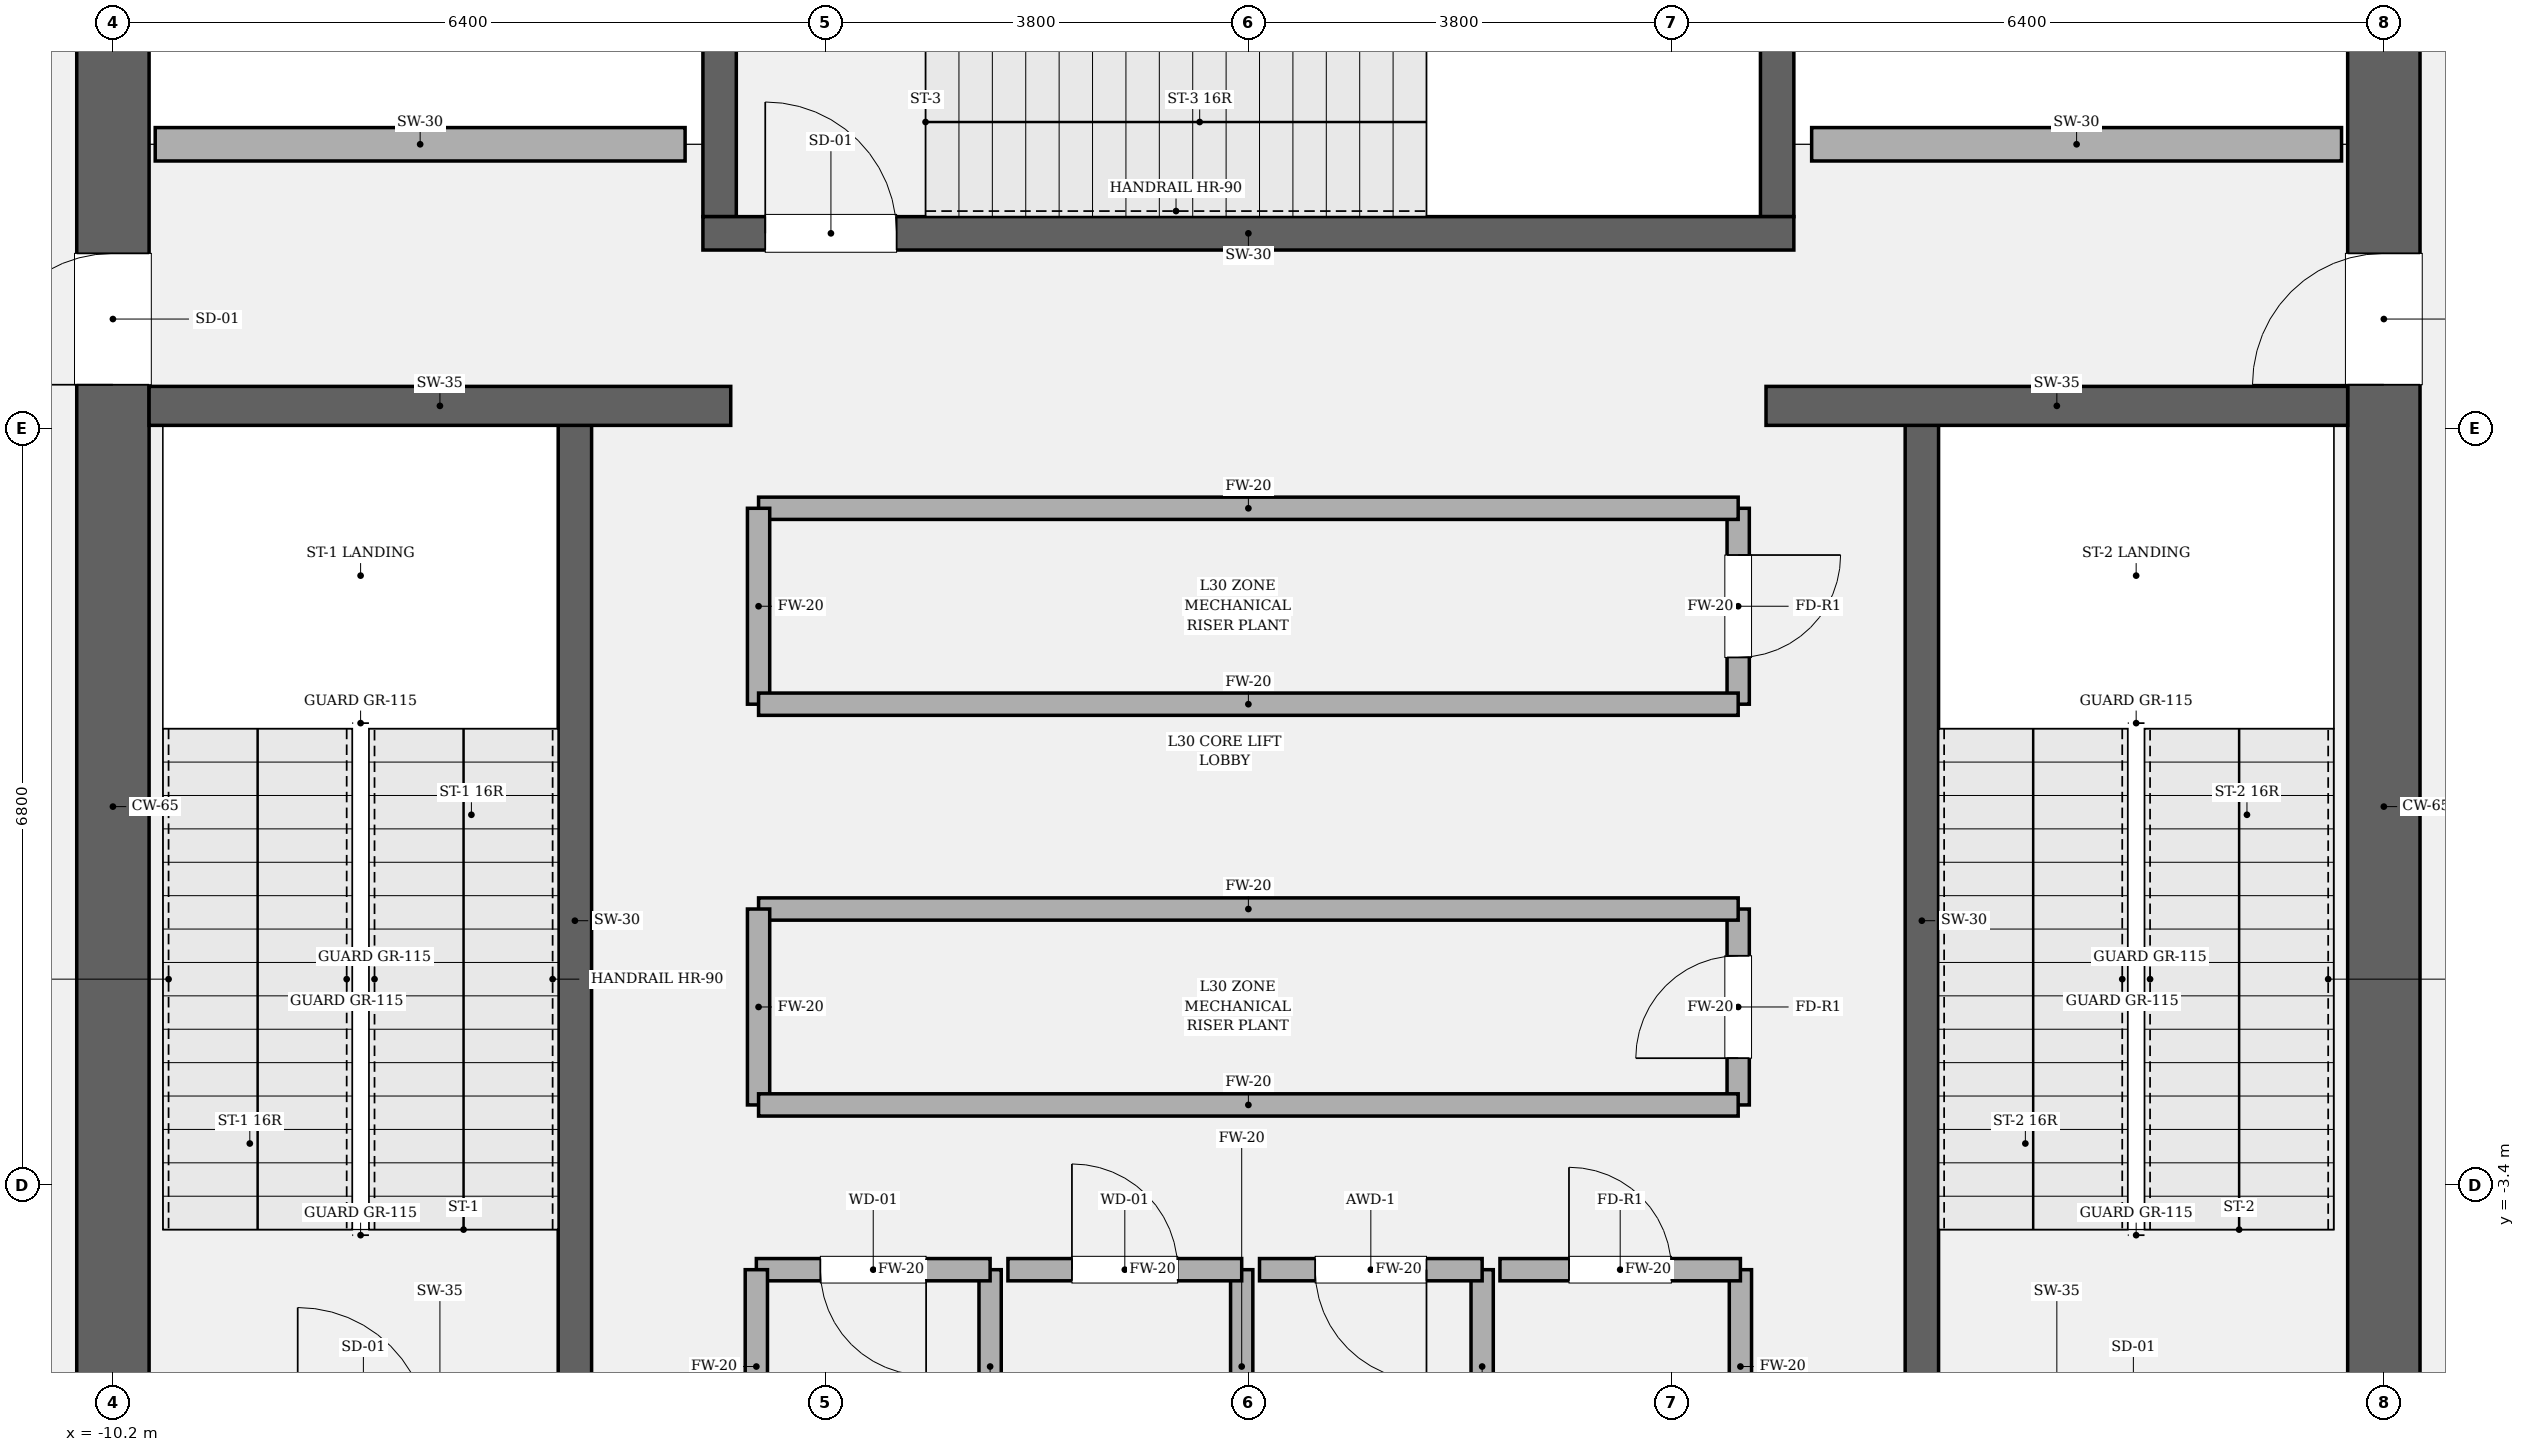
"""IFC4 building model, lengths in metres.
Left out: names, types, materials, properties, quantities, classifications, styles, units other than length and angle.
Written with IfcOpenShell. Run it as: python <this file> out.ifc"""

import sys

from ifc_helpers import new_model, si_unit, direction, frame, frame_2d, origin, place, context, subcontext, project, spatial, rectangle, extrude, element, fill, save


model = new_model("IFC4")
c1 = context("Model", 3, precision=1e-05, world=origin(), true_north=direction((0.0, 1.0)))
c2 = subcontext(c1, "Body", "Model", "MODEL_VIEW")
j1 = project(units=[si_unit("LENGTHUNIT", "METRE"), si_unit("PLANEANGLEUNIT", "RADIAN")], contexts=[c1])
p1 = place(None, origin())
s1 = spatial("IfcSite", under=j1, at=p1, CompositionType="ELEMENT")
p2 = place(p1, origin())
s2 = spatial("IfcBuilding", under=s1, at=p2, CompositionType="ELEMENT")
p3 = place(p2, frame((0.0, 0.0, 130.2)))
s3 = spatial("IfcBuildingStorey", under=s2, at=p3, CompositionType="ELEMENT", Elevation=130.2)
p4 = place(p3, frame((-10.2, -8.875, 0.0), z_axis=(0.0, 0.0, 1.0), x_axis=(0.0, 1.0, 0.0)))
e1 = element("IfcWall", 1, at=p4, inside=s3, PredefinedType="SHEAR", context=c2, shape_type="SweptSolid", body=[
    extrude(rectangle(XDim=17.75, YDim=0.65, at=frame_2d((8.875, 0.0))), origin(), (0.0, 0.0, 1.0), 4.8),
])
p5 = place(p4, frame((12.665, 0.0, 0.0)))
e2 = element("IfcOpeningElement", 2, at=p5, cuts=e1, PredefinedType="OPENING", context=c2, shape_type="SweptSolid", body=[
    extrude(rectangle(XDim=1.18, YDim=2.2, at=frame_2d((0.59, 1.1))), frame((0.0, 0.335, 0.0), z_axis=(0.0, -1.0, 0.0), x_axis=(1.0, 0.0, 0.0)), (0.0, 0.0, 1.0), 0.67),
])
p6 = place(p3, frame((10.2, 8.875, 0.0), z_axis=(0.0, 0.0, 1.0), x_axis=(0.0, -1.0, 0.0)))
e3 = element("IfcWall", 3, at=p6, inside=s3, PredefinedType="SHEAR", context=c2, shape_type="SweptSolid", body=[
    extrude(rectangle(XDim=17.75, YDim=0.65, at=frame_2d((8.875, 0.0))), origin(), (0.0, 0.0, 1.0), 4.8),
])
p7 = place(p6, frame((3.905, 0.0, 0.0)))
e4 = element("IfcOpeningElement", 4, at=p7, cuts=e3, PredefinedType="OPENING", context=c2, shape_type="SweptSolid", body=[
    extrude(rectangle(XDim=1.18, YDim=2.2, at=frame_2d((0.59, 1.1))), frame((0.0, 0.335, 0.0), z_axis=(0.0, -1.0, 0.0), x_axis=(1.0, 0.0, 0.0)), (0.0, 0.0, 1.0), 0.67),
])
for number, where, z_axis, x_axis in (
    (5, (-6.05, -5.5, 0.0), (0.0, 0.0, 1.0), (0.0, 1.0, 0.0)),
    (6, (6.05, 3.45, 0.0), (0.0, 0.0, 1.0), (0.0, -1.0, 0.0)),
):
    element("IfcWall", number, at=place(p3, frame(where, z_axis=z_axis, x_axis=x_axis)), inside=s3, PredefinedType="SOLIDWALL", context=c2, shape_type="SweptSolid", body=[
        extrude(rectangle(XDim=8.95, YDim=0.3, at=frame_2d((4.475, 0.0))), origin(), (0.0, 0.0, 1.0), 4.8),
    ])
for number, where, z_axis, x_axis in (
    (7, (-4.75, 5.3, 0.0), (0.0, 0.0, 1.0), (0.0, 1.0, 0.0)),
    (8, (4.75, 8.875, 0.0), (0.0, 0.0, 1.0), (0.0, -1.0, 0.0)),
):
    element("IfcWall", number, at=place(p3, frame(where, z_axis=z_axis, x_axis=x_axis)), inside=s3, PredefinedType="SOLIDWALL", context=c2, shape_type="SweptSolid", body=[
        extrude(rectangle(XDim=3.575, YDim=0.3, at=frame_2d((1.788, 0.0))), origin(), (0.0, 0.0, 1.0), 4.8),
    ])
p8 = place(p3, frame((-4.9, 5.15, 0.0), z_axis=(0.0, 0.0, 1.0), x_axis=(1.0, 0.0, 0.0)))
e9 = element("IfcWall", 9, at=p8, inside=s3, PredefinedType="SOLIDWALL", context=c2, shape_type="SweptSolid", body=[
    extrude(rectangle(XDim=9.8, YDim=0.3, at=frame_2d((4.9, 0.0))), origin(), (0.0, 0.0, 1.0), 4.8),
])
p9 = place(p8, frame((0.56, 0.0, 0.0)))
e10 = element("IfcOpeningElement", 10, at=p9, cuts=e9, PredefinedType="OPENING", context=c2, shape_type="SweptSolid", body=[
    extrude(rectangle(XDim=1.18, YDim=2.2, at=frame_2d((0.59, 1.1))), frame((0.0, 0.16, 0.0), z_axis=(0.0, -1.0, 0.0), x_axis=(1.0, 0.0, 0.0)), (0.0, 0.0, 1.0), 0.32),
])
for number, where, z_axis, x_axis in (
    (11, (-9.875, 3.6, 0.0), (0.0, 0.0, 1.0), (1.0, 0.0, 0.0)),
    (12, (4.65, 3.6, 0.0), (0.0, 0.0, 1.0), (1.0, 0.0, 0.0)),
):
    element("IfcWall", number, at=place(p3, frame(where, z_axis=z_axis, x_axis=x_axis)), inside=s3, PredefinedType="SOLIDWALL", context=c2, shape_type="SweptSolid", body=[
        extrude(rectangle(XDim=5.225, YDim=0.35, at=frame_2d((2.613, 0.0))), origin(), (0.0, 0.0, 1.0), 4.8),
    ])
for number, where, z_axis, x_axis in (
    (13, (-9.82, 5.95, 0.0), (0.0, 0.0, 1.0), (1.0, 0.0, 0.0)),
    (14, (5.06, 5.95, 0.0), (0.0, 0.0, 1.0), (1.0, 0.0, 0.0)),
):
    element("IfcWall", number, at=place(p3, frame(where, z_axis=z_axis, x_axis=x_axis)), inside=s3, PredefinedType="SOLIDWALL", context=c2, shape_type="SweptSolid", body=[
        extrude(rectangle(XDim=4.76, YDim=0.3, at=frame_2d((2.38, 0.0))), origin(), (0.0, 0.0, 1.0), 4.54),
    ])
p10 = place(p3, frame((-2.32, -5.9, 0.0), z_axis=(0.0, 0.0, 1.0), x_axis=(0.0, 1.0, 0.0)))
e15 = element("IfcWall", 15, at=p10, inside=s3, PredefinedType="SOLIDWALL", context=c2, shape_type="SweptSolid", body=[
    extrude(rectangle(XDim=1.74, YDim=0.2, at=frame_2d((0.87, 0.0))), origin(), (0.0, 0.0, 1.0), 4.54),
])
p11 = place(p3, frame((-2.32, -4.16, 0.0), z_axis=(0.0, 0.0, 1.0), x_axis=(-1.0, 0.0, 0.0)))
e16 = element("IfcWall", 16, at=p11, inside=s3, PredefinedType="SOLIDWALL", context=c2, shape_type="SweptSolid", body=[
    extrude(rectangle(XDim=2.1, YDim=0.2, at=frame_2d((1.05, 0.0))), origin(), (0.0, 0.0, 1.0), 4.54),
])
p12 = place(p11, frame((0.575, 0.0, 0.0)))
e17 = element("IfcOpeningElement", 17, at=p12, cuts=e16, PredefinedType="OPENING", context=c2, shape_type="SweptSolid", body=[
    extrude(rectangle(XDim=0.95, YDim=2.15, at=frame_2d((0.475, 1.075))), frame((0.0, 0.11, 0.0), z_axis=(0.0, -1.0, 0.0), x_axis=(1.0, 0.0, 0.0)), (0.0, 0.0, 1.0), 0.22),
])
for number, where, z_axis, x_axis in (
    (18, (-4.42, -4.16, 0.0), (0.0, 0.0, 1.0), (0.0, -1.0, 0.0)),
    (19, (-0.06, -5.9, 0.0), (0.0, 0.0, 1.0), (0.0, 1.0, 0.0)),
):
    element("IfcWall", number, at=place(p3, frame(where, z_axis=z_axis, x_axis=x_axis)), inside=s3, PredefinedType="SOLIDWALL", context=c2, shape_type="SweptSolid", body=[
        extrude(rectangle(XDim=1.74, YDim=0.2, at=frame_2d((0.87, 0.0))), origin(), (0.0, 0.0, 1.0), 4.54),
    ])
p13 = place(p3, frame((-0.06, -4.16, 0.0), z_axis=(0.0, 0.0, 1.0), x_axis=(-1.0, 0.0, 0.0)))
e20 = element("IfcWall", 20, at=p13, inside=s3, PredefinedType="SOLIDWALL", context=c2, shape_type="SweptSolid", body=[
    extrude(rectangle(XDim=2.1, YDim=0.2, at=frame_2d((1.05, 0.0))), origin(), (0.0, 0.0, 1.0), 4.54),
])
p14 = place(p13, frame((0.575, 0.0, 0.0)))
e21 = element("IfcOpeningElement", 21, at=p14, cuts=e20, PredefinedType="OPENING", context=c2, shape_type="SweptSolid", body=[
    extrude(rectangle(XDim=0.95, YDim=2.15, at=frame_2d((0.475, 1.075))), frame((0.0, 0.11, 0.0), z_axis=(0.0, -1.0, 0.0), x_axis=(1.0, 0.0, 0.0)), (0.0, 0.0, 1.0), 0.22),
])
p15 = place(p3, frame((2.1, -5.9, 0.0), z_axis=(0.0, 0.0, 1.0), x_axis=(0.0, 1.0, 0.0)))
e22 = element("IfcWall", 22, at=p15, inside=s3, PredefinedType="SOLIDWALL", context=c2, shape_type="SweptSolid", body=[
    extrude(rectangle(XDim=1.74, YDim=0.2, at=frame_2d((0.87, 0.0))), origin(), (0.0, 0.0, 1.0), 4.54),
])
p16 = place(p3, frame((2.1, -4.16, 0.0), z_axis=(0.0, 0.0, 1.0), x_axis=(-1.0, 0.0, 0.0)))
e23 = element("IfcWall", 23, at=p16, inside=s3, PredefinedType="SOLIDWALL", context=c2, shape_type="SweptSolid", body=[
    extrude(rectangle(XDim=2.0, YDim=0.2, at=frame_2d((1.0, 0.0))), origin(), (0.0, 0.0, 1.0), 4.54),
])
p17 = place(p16, frame((0.5, 0.0, 0.0)))
e24 = element("IfcOpeningElement", 24, at=p17, cuts=e23, PredefinedType="OPENING", context=c2, shape_type="SweptSolid", body=[
    extrude(rectangle(XDim=1.0, YDim=2.15, at=frame_2d((0.5, 1.075))), frame((0.0, 0.11, 0.0), z_axis=(0.0, -1.0, 0.0), x_axis=(1.0, 0.0, 0.0)), (0.0, 0.0, 1.0), 0.22),
])
p18 = place(p3, frame((4.42, -5.9, 0.0), z_axis=(0.0, 0.0, 1.0), x_axis=(0.0, 1.0, 0.0)))
e25 = element("IfcWall", 25, at=p18, inside=s3, PredefinedType="SOLIDWALL", context=c2, shape_type="SweptSolid", body=[
    extrude(rectangle(XDim=1.74, YDim=0.2, at=frame_2d((0.87, 0.0))), origin(), (0.0, 0.0, 1.0), 4.54),
])
p19 = place(p3, frame((4.42, -4.16, 0.0), z_axis=(0.0, 0.0, 1.0), x_axis=(-1.0, 0.0, 0.0)))
e26 = element("IfcWall", 26, at=p19, inside=s3, PredefinedType="SOLIDWALL", context=c2, shape_type="SweptSolid", body=[
    extrude(rectangle(XDim=2.16, YDim=0.2, at=frame_2d((1.08, 0.0))), origin(), (0.0, 0.0, 1.0), 4.54),
])
p20 = place(p19, frame((0.62, 0.0, 0.0)))
e27 = element("IfcOpeningElement", 27, at=p20, cuts=e26, PredefinedType="OPENING", context=c2, shape_type="SweptSolid", body=[
    extrude(rectangle(XDim=0.92, YDim=2.1, at=frame_2d((0.46, 1.05))), frame((0.0, 0.11, 0.0), z_axis=(0.0, -1.0, 0.0), x_axis=(1.0, 0.0, 0.0)), (0.0, 0.0, 1.0), 0.22),
])
p21 = place(p3, frame((4.4, -2.68, 0.0), z_axis=(0.0, 0.0, 1.0), x_axis=(0.0, 1.0, 0.0)))
e28 = element("IfcWall", 28, at=p21, inside=s3, PredefinedType="SOLIDWALL", context=c2, shape_type="SweptSolid", body=[
    extrude(rectangle(XDim=1.76, YDim=0.2, at=frame_2d((0.88, 0.0))), origin(), (0.0, 0.0, 1.0), 4.54),
])
p22 = place(p21, frame((0.42, 0.0, 0.0)))
e29 = element("IfcOpeningElement", 29, at=p22, cuts=e28, PredefinedType="OPENING", context=c2, shape_type="SweptSolid", body=[
    extrude(rectangle(XDim=0.92, YDim=2.1, at=frame_2d((0.46, 1.05))), frame((0.0, 0.11, 0.0), z_axis=(0.0, -1.0, 0.0), x_axis=(1.0, 0.0, 0.0)), (0.0, 0.0, 1.0), 0.22),
])
p23 = place(p3, frame((4.4, -0.92, 0.0), z_axis=(0.0, 0.0, 1.0), x_axis=(-1.0, 0.0, 0.0)))
e30 = element("IfcWall", 30, at=p23, inside=s3, PredefinedType="SOLIDWALL", context=c2, shape_type="SweptSolid", body=[
    extrude(rectangle(XDim=8.8, YDim=0.2, at=frame_2d((4.4, 0.0))), origin(), (0.0, 0.0, 1.0), 4.54),
])
p24 = place(p3, frame((-4.4, -0.92, 0.0), z_axis=(0.0, 0.0, 1.0), x_axis=(0.0, -1.0, 0.0)))
e31 = element("IfcWall", 31, at=p24, inside=s3, PredefinedType="SOLIDWALL", context=c2, shape_type="SweptSolid", body=[
    extrude(rectangle(XDim=1.76, YDim=0.2, at=frame_2d((0.88, 0.0))), origin(), (0.0, 0.0, 1.0), 4.54),
])
p25 = place(p3, frame((-4.4, -2.68, 0.0), z_axis=(0.0, 0.0, 1.0), x_axis=(1.0, 0.0, 0.0)))
e32 = element("IfcWall", 32, at=p25, inside=s3, PredefinedType="SOLIDWALL", context=c2, shape_type="SweptSolid", body=[
    extrude(rectangle(XDim=8.8, YDim=0.2, at=frame_2d((4.4, 0.0))), origin(), (0.0, 0.0, 1.0), 4.54),
])
p26 = place(p3, frame((4.4, 0.92, 0.0), z_axis=(0.0, 0.0, 1.0), x_axis=(0.0, 1.0, 0.0)))
e33 = element("IfcWall", 33, at=p26, inside=s3, PredefinedType="SOLIDWALL", context=c2, shape_type="SweptSolid", body=[
    extrude(rectangle(XDim=1.76, YDim=0.2, at=frame_2d((0.88, 0.0))), origin(), (0.0, 0.0, 1.0), 4.54),
])
p27 = place(p26, frame((0.42, 0.0, 0.0)))
e34 = element("IfcOpeningElement", 34, at=p27, cuts=e33, PredefinedType="OPENING", context=c2, shape_type="SweptSolid", body=[
    extrude(rectangle(XDim=0.92, YDim=2.1, at=frame_2d((0.46, 1.05))), frame((0.0, 0.11, 0.0), z_axis=(0.0, -1.0, 0.0), x_axis=(1.0, 0.0, 0.0)), (0.0, 0.0, 1.0), 0.22),
])
p28 = place(p3, frame((4.4, 2.68, 0.0), z_axis=(0.0, 0.0, 1.0), x_axis=(-1.0, 0.0, 0.0)))
e35 = element("IfcWall", 35, at=p28, inside=s3, PredefinedType="SOLIDWALL", context=c2, shape_type="SweptSolid", body=[
    extrude(rectangle(XDim=8.8, YDim=0.2, at=frame_2d((4.4, 0.0))), origin(), (0.0, 0.0, 1.0), 4.54),
])
p29 = place(p3, frame((-4.4, 2.68, 0.0), z_axis=(0.0, 0.0, 1.0), x_axis=(0.0, -1.0, 0.0)))
e36 = element("IfcWall", 36, at=p29, inside=s3, PredefinedType="SOLIDWALL", context=c2, shape_type="SweptSolid", body=[
    extrude(rectangle(XDim=1.76, YDim=0.2, at=frame_2d((0.88, 0.0))), origin(), (0.0, 0.0, 1.0), 4.54),
])
p30 = place(p3, frame((-4.4, 0.92, 0.0), z_axis=(0.0, 0.0, 1.0), x_axis=(1.0, 0.0, 0.0)))
e37 = element("IfcWall", 37, at=p30, inside=s3, PredefinedType="SOLIDWALL", context=c2, shape_type="SweptSolid", body=[
    extrude(rectangle(XDim=8.8, YDim=0.2, at=frame_2d((4.4, 0.0))), origin(), (0.0, 0.0, 1.0), 4.54),
])
p31 = place(p9, origin())
e38 = element("IfcDoor", 38, at=p31, inside=s3, OperationType="SINGLE_SWING_LEFT", PredefinedType="DOOR", context=c2, shape_type="SweptSolid", body=[
    extrude(rectangle(XDim=1.18, YDim=2.2, at=frame_2d((0.59, 1.1))), frame((0.0, 0.025, 0.0), z_axis=(0.0, -1.0, 0.0), x_axis=(1.0, 0.0, 0.0)), (0.0, 0.0, 1.0), 0.05),
])
fill(e10, e38)
p32 = place(p5, origin())
e39 = element("IfcDoor", 39, at=p32, inside=s3, OperationType="SINGLE_SWING_LEFT", PredefinedType="DOOR", context=c2, shape_type="SweptSolid", body=[
    extrude(rectangle(XDim=1.18, YDim=2.2, at=frame_2d((0.59, 1.1))), frame((0.0, 0.025, 0.0), z_axis=(0.0, -1.0, 0.0), x_axis=(1.0, 0.0, 0.0)), (0.0, 0.0, 1.0), 0.05),
])
fill(e2, e39)
p33 = place(p7, origin())
e40 = element("IfcDoor", 40, at=p33, inside=s3, OperationType="SINGLE_SWING_RIGHT", PredefinedType="DOOR", context=c2, shape_type="SweptSolid", body=[
    extrude(rectangle(XDim=1.18, YDim=2.2, at=frame_2d((0.59, 1.1))), frame((0.0, 0.025, 0.0), z_axis=(0.0, -1.0, 0.0), x_axis=(1.0, 0.0, 0.0)), (0.0, 0.0, 1.0), 0.05),
])
fill(e4, e40)
p34 = place(p12, origin())
e41 = element("IfcDoor", 41, at=p34, inside=s3, OperationType="SINGLE_SWING_LEFT", PredefinedType="DOOR", context=c2, shape_type="SweptSolid", body=[
    extrude(rectangle(XDim=0.95, YDim=2.15, at=frame_2d((0.475, 1.075))), frame((0.0, 0.025, 0.0), z_axis=(0.0, -1.0, 0.0), x_axis=(1.0, 0.0, 0.0)), (0.0, 0.0, 1.0), 0.05),
])
fill(e17, e41)
p35 = place(p14, origin())
e42 = element("IfcDoor", 42, at=p35, inside=s3, OperationType="SINGLE_SWING_RIGHT", PredefinedType="DOOR", context=c2, shape_type="SweptSolid", body=[
    extrude(rectangle(XDim=0.95, YDim=2.15, at=frame_2d((0.475, 1.075))), frame((0.0, 0.025, 0.0), z_axis=(0.0, -1.0, 0.0), x_axis=(1.0, 0.0, 0.0)), (0.0, 0.0, 1.0), 0.05),
])
fill(e21, e42)
p36 = place(p17, origin())
e43 = element("IfcDoor", 43, at=p36, inside=s3, OperationType="SINGLE_SWING_LEFT", PredefinedType="DOOR", context=c2, shape_type="SweptSolid", body=[
    extrude(rectangle(XDim=1.0, YDim=2.15, at=frame_2d((0.5, 1.075))), frame((0.0, 0.025, 0.0), z_axis=(0.0, -1.0, 0.0), x_axis=(1.0, 0.0, 0.0)), (0.0, 0.0, 1.0), 0.05),
])
fill(e24, e43)
p37 = place(p20, origin())
e44 = element("IfcDoor", 44, at=p37, inside=s3, OperationType="SINGLE_SWING_RIGHT", PredefinedType="DOOR", context=c2, shape_type="SweptSolid", body=[
    extrude(rectangle(XDim=0.92, YDim=2.1, at=frame_2d((0.46, 1.05))), frame((0.0, 0.025, 0.0), z_axis=(0.0, -1.0, 0.0), x_axis=(1.0, 0.0, 0.0)), (0.0, 0.0, 1.0), 0.05),
])
fill(e27, e44)
p38 = place(p22, origin())
e45 = element("IfcDoor", 45, at=p38, inside=s3, OperationType="SINGLE_SWING_LEFT", PredefinedType="DOOR", context=c2, shape_type="SweptSolid", body=[
    extrude(rectangle(XDim=0.92, YDim=2.1, at=frame_2d((0.46, 1.05))), frame((0.0, 0.025, 0.0), z_axis=(0.0, -1.0, 0.0), x_axis=(1.0, 0.0, 0.0)), (0.0, 0.0, 1.0), 0.05),
])
fill(e29, e45)
p39 = place(p27, origin())
e46 = element("IfcDoor", 46, at=p39, inside=s3, OperationType="SINGLE_SWING_RIGHT", PredefinedType="DOOR", context=c2, shape_type="SweptSolid", body=[
    extrude(rectangle(XDim=0.92, YDim=2.1, at=frame_2d((0.46, 1.05))), frame((0.0, 0.025, 0.0), z_axis=(0.0, -1.0, 0.0), x_axis=(1.0, 0.0, 0.0)), (0.0, 0.0, 1.0), 0.05),
])
fill(e34, e46)
save(model, sys.argv[1])
